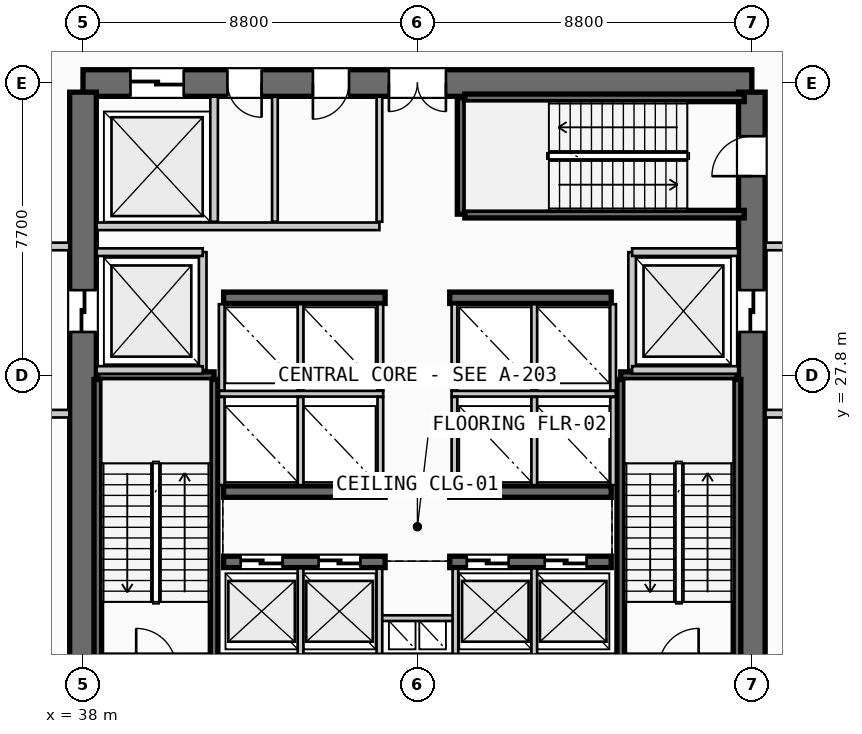
"""IFC4 building model, lengths in metres.
Left out: names, types, materials, properties, quantities, classifications, styles, units other than length and angle.
Written with IfcOpenShell. Run it as: python <this file> out.ifc"""

import sys

from ifc_helpers import new_model, si_unit, direction, frame, frame_2d, origin, place, context, subcontext, project, spatial, rectangle, extrude, source, transform, mapped, element, fill, save


model = new_model("IFC4")
c1 = context("Model", 3, precision=1e-05, world=origin(), true_north=direction((0.0, 1.0)))
c2 = subcontext(c1, "Body", "Model", "MODEL_VIEW")
j1 = project(units=[si_unit("LENGTHUNIT", "METRE"), si_unit("PLANEANGLEUNIT", "RADIAN")], contexts=[c1])
p1 = place(None, origin())
s1 = spatial("IfcSite", under=j1, at=p1, CompositionType="ELEMENT")
p2 = place(p1, origin())
s2 = spatial("IfcBuilding", under=s1, at=p2, CompositionType="ELEMENT")
p3 = place(p2, frame((0.0, 0.0, 14.8)))
s3 = spatial("IfcBuildingStorey", under=s2, at=p3, CompositionType="ELEMENT", Elevation=14.8)
p4 = place(p3, frame((38.0, 20.1, 0.0), z_axis=(0.0, 0.0, 1.0), x_axis=(1.0, 0.0, 0.0)))
e1 = element("IfcWall", 1, at=p4, inside=s3, PredefinedType="SHEAR", context=c2, shape_type="SweptSolid", body=[
    extrude(rectangle(XDim=17.6, YDim=0.7, at=frame_2d((8.8, 0.0))), origin(), (0.0, 0.0, 1.0), 4.53),
])
p5 = place(p4, frame((1.4, 0.0, 0.0)))
e2 = element("IfcOpeningElement", 2, at=p5, cuts=e1, PredefinedType="OPENING", context=c2, shape_type="SweptSolid", body=[
    extrude(rectangle(XDim=1.05, YDim=2.15, at=frame_2d((0.525, 1.075))), frame((0.0, 0.36, 0.0), z_axis=(0.0, -1.0, 0.0), x_axis=(1.0, 0.0, 0.0)), (0.0, 0.0, 1.0), 0.72),
])
p6 = place(p4, frame((15.15, 0.0, 0.0)))
e3 = element("IfcOpeningElement", 3, at=p6, cuts=e1, PredefinedType="OPENING", context=c2, shape_type="SweptSolid", body=[
    extrude(rectangle(XDim=1.05, YDim=2.15, at=frame_2d((0.525, 1.075))), frame((0.0, 0.36, 0.0), z_axis=(0.0, -1.0, 0.0), x_axis=(1.0, 0.0, 0.0)), (0.0, 0.0, 1.0), 0.72),
])
p7 = place(p3, frame((55.6, 35.5, 0.0), z_axis=(0.0, 0.0, 1.0), x_axis=(-1.0, 0.0, 0.0)))
e4 = element("IfcWall", 4, at=p7, inside=s3, PredefinedType="SHEAR", context=c2, shape_type="SweptSolid", body=[
    extrude(rectangle(XDim=17.6, YDim=0.7, at=frame_2d((8.8, 0.0))), origin(), (0.0, 0.0, 1.0), 4.53),
])
p8 = place(p7, frame((8.05, 0.0, 0.0)))
e5 = element("IfcOpeningElement", 5, at=p8, cuts=e4, PredefinedType="OPENING", context=c2, shape_type="SweptSolid", body=[
    extrude(rectangle(XDim=1.5, YDim=2.2, at=frame_2d((0.75, 1.1))), frame((0.0, 0.36, 0.0), z_axis=(0.0, -1.0, 0.0), x_axis=(1.0, 0.0, 0.0)), (0.0, 0.0, 1.0), 0.72),
])
p9 = place(p7, frame((14.95, 0.0, 0.0)))
e6 = element("IfcOpeningElement", 6, at=p9, cuts=e4, PredefinedType="OPENING", context=c2, shape_type="SweptSolid", body=[
    extrude(rectangle(XDim=1.4, YDim=2.3, at=frame_2d((0.7, 1.15))), frame((0.0, 0.36, 0.0), z_axis=(0.0, -1.0, 0.0), x_axis=(1.0, 0.0, 0.0)), (0.0, 0.0, 1.0), 0.72),
])
p10 = place(p7, frame((12.9, 0.0, 0.0)))
e7 = element("IfcOpeningElement", 7, at=p10, cuts=e4, PredefinedType="OPENING", context=c2, shape_type="SweptSolid", body=[
    extrude(rectangle(XDim=0.9, YDim=2.15, at=frame_2d((0.45, 1.075))), frame((0.0, 0.36, 0.0), z_axis=(0.0, -1.0, 0.0), x_axis=(1.0, 0.0, 0.0)), (0.0, 0.0, 1.0), 0.72),
])
p11 = place(p7, frame((10.6, 0.0, 0.0)))
e8 = element("IfcOpeningElement", 8, at=p11, cuts=e4, PredefinedType="OPENING", context=c2, shape_type="SweptSolid", body=[
    extrude(rectangle(XDim=0.95, YDim=2.15, at=frame_2d((0.475, 1.075))), frame((0.0, 0.36, 0.0), z_axis=(0.0, -1.0, 0.0), x_axis=(1.0, 0.0, 0.0)), (0.0, 0.0, 1.0), 0.72),
])
p12 = place(p3, frame((38.0, 35.26, 0.0), z_axis=(0.0, 0.0, 1.0), x_axis=(0.0, -1.0, 0.0)))
e9 = element("IfcWall", 9, at=p12, inside=s3, PredefinedType="SHEAR", context=c2, shape_type="SweptSolid", body=[
    extrude(rectangle(XDim=14.92, YDim=0.7, at=frame_2d((7.46, 0.0))), origin(), (0.0, 0.0, 1.0), 4.53),
])
p13 = place(p12, frame((5.21, 0.0, 0.0)))
e10 = element("IfcOpeningElement", 10, at=p13, cuts=e9, PredefinedType="OPENING", context=c2, shape_type="SweptSolid", body=[
    extrude(rectangle(XDim=1.1, YDim=2.2, at=frame_2d((0.55, 1.1))), frame((0.0, 0.36, 0.0), z_axis=(0.0, -1.0, 0.0), x_axis=(1.0, 0.0, 0.0)), (0.0, 0.0, 1.0), 0.72),
])
p14 = place(p3, frame((55.6, 20.34, 0.0), z_axis=(0.0, 0.0, 1.0), x_axis=(0.0, 1.0, 0.0)))
e11 = element("IfcWall", 11, at=p14, inside=s3, PredefinedType="SHEAR", context=c2, shape_type="SweptSolid", body=[
    extrude(rectangle(XDim=14.92, YDim=0.7, at=frame_2d((7.46, 0.0))), origin(), (0.0, 0.0, 1.0), 4.53),
])
p15 = place(p14, frame((12.71, 0.0, 0.0)))
e12 = element("IfcOpeningElement", 12, at=p15, cuts=e11, PredefinedType="OPENING", context=c2, shape_type="SweptSolid", body=[
    extrude(rectangle(XDim=1.05, YDim=2.15, at=frame_2d((0.525, 1.075))), frame((0.0, 0.36, 0.0), z_axis=(0.0, -1.0, 0.0), x_axis=(1.0, 0.0, 0.0)), (0.0, 0.0, 1.0), 0.72),
])
p16 = place(p14, frame((8.61, 0.0, 0.0)))
e13 = element("IfcOpeningElement", 13, at=p16, cuts=e11, PredefinedType="OPENING", context=c2, shape_type="SweptSolid", body=[
    extrude(rectangle(XDim=1.1, YDim=2.2, at=frame_2d((0.55, 1.1))), frame((0.0, 0.36, 0.0), z_axis=(0.0, -1.0, 0.0), x_axis=(1.0, 0.0, 0.0)), (0.0, 0.0, 1.0), 0.72),
])
p17 = place(p3, frame((41.7, 22.9, 0.0), z_axis=(0.0, 0.0, 1.0), x_axis=(1.0, 0.0, 0.0)))
e14 = element("IfcWall", 14, at=p17, inside=s3, PredefinedType="SHEAR", context=c2, shape_type="SweptSolid", body=[
    extrude(rectangle(XDim=4.25, YDim=0.3, at=frame_2d((2.125, 0.0))), origin(), (0.0, 0.0, 1.0), 4.53),
])
p18 = place(p17, frame((0.45, 0.0, 0.0)))
e15 = element("IfcOpeningElement", 15, at=p18, cuts=e14, PredefinedType="OPENING", context=c2, shape_type="SweptSolid", body=[
    extrude(rectangle(XDim=1.1, YDim=2.2, at=frame_2d((0.55, 1.1))), frame((0.0, 0.16, 0.0), z_axis=(0.0, -1.0, 0.0), x_axis=(1.0, 0.0, 0.0)), (0.0, 0.0, 1.0), 0.32),
])
p19 = place(p17, frame((2.5, 0.0, 0.0)))
e16 = element("IfcOpeningElement", 16, at=p19, cuts=e14, PredefinedType="OPENING", context=c2, shape_type="SweptSolid", body=[
    extrude(rectangle(XDim=1.1, YDim=2.2, at=frame_2d((0.55, 1.1))), frame((0.0, 0.16, 0.0), z_axis=(0.0, -1.0, 0.0), x_axis=(1.0, 0.0, 0.0)), (0.0, 0.0, 1.0), 0.32),
])
p20 = place(p3, frame((47.65, 22.9, 0.0), z_axis=(0.0, 0.0, 1.0), x_axis=(1.0, 0.0, 0.0)))
e17 = element("IfcWall", 17, at=p20, inside=s3, PredefinedType="SHEAR", context=c2, shape_type="SweptSolid", body=[
    extrude(rectangle(XDim=4.25, YDim=0.3, at=frame_2d((2.125, 0.0))), origin(), (0.0, 0.0, 1.0), 4.53),
])
p21 = place(p20, frame((0.45, 0.0, 0.0)))
e18 = element("IfcOpeningElement", 18, at=p21, cuts=e17, PredefinedType="OPENING", context=c2, shape_type="SweptSolid", body=[
    extrude(rectangle(XDim=1.1, YDim=2.2, at=frame_2d((0.55, 1.1))), frame((0.0, 0.16, 0.0), z_axis=(0.0, -1.0, 0.0), x_axis=(1.0, 0.0, 0.0)), (0.0, 0.0, 1.0), 0.32),
])
p22 = place(p20, frame((2.5, 0.0, 0.0)))
e19 = element("IfcOpeningElement", 19, at=p22, cuts=e17, PredefinedType="OPENING", context=c2, shape_type="SweptSolid", body=[
    extrude(rectangle(XDim=1.1, YDim=2.2, at=frame_2d((0.55, 1.1))), frame((0.0, 0.16, 0.0), z_axis=(0.0, -1.0, 0.0), x_axis=(1.0, 0.0, 0.0)), (0.0, 0.0, 1.0), 0.32),
])
for number, where, z_axis, x_axis in (
    (20, (41.7, 24.75, 0.0), (0.0, 0.0, 1.0), (1.0, 0.0, 0.0)),
    (21, (47.65, 24.75, 0.0), (0.0, 0.0, 1.0), (1.0, 0.0, 0.0)),
    (22, (41.7, 29.85, 0.0), (0.0, 0.0, 1.0), (1.0, 0.0, 0.0)),
    (23, (47.65, 29.85, 0.0), (0.0, 0.0, 1.0), (1.0, 0.0, 0.0)),
):
    element("IfcWall", number, at=place(p3, frame(where, z_axis=z_axis, x_axis=x_axis)), inside=s3, PredefinedType="SHEAR", context=c2, shape_type="SweptSolid", body=[
        extrude(rectangle(XDim=4.25, YDim=0.3, at=frame_2d((2.125, 0.0))), origin(), (0.0, 0.0, 1.0), 4.53),
    ])
p23 = place(p3, frame((38.39, 27.8, 0.0), z_axis=(0.0, 0.0, 1.0), x_axis=(1.0, 0.0, 0.0)))
e24 = element("IfcWall", 24, at=p23, inside=s3, PredefinedType="SHEAR", context=c2, shape_type="SweptSolid", body=[
    extrude(rectangle(XDim=3.06, YDim=0.2, at=frame_2d((1.53, 0.0))), origin(), (0.0, 0.0, 1.0), 4.53),
])
for number, where, z_axis, x_axis in (
    (25, (41.45, 27.7, 0.0), (0.0, 0.0, 1.0), (0.0, -1.0, 0.0)),
    (26, (38.39, 20.35, 0.0), (0.0, 0.0, 1.0), (0.0, 1.0, 0.0)),
):
    element("IfcWall", number, at=place(p3, frame(where, z_axis=z_axis, x_axis=x_axis)), inside=s3, PredefinedType="SHEAR", context=c2, shape_type="SweptSolid", body=[
        extrude(rectangle(XDim=7.35, YDim=0.2, at=frame_2d((3.675, 0.0))), origin(), (0.0, 0.0, 1.0), 4.53),
    ])
p24 = place(p3, frame((52.15, 27.8, 0.0), z_axis=(0.0, 0.0, 1.0), x_axis=(1.0, 0.0, 0.0)))
e27 = element("IfcWall", 27, at=p24, inside=s3, PredefinedType="SHEAR", context=c2, shape_type="SweptSolid", body=[
    extrude(rectangle(XDim=3.06, YDim=0.2, at=frame_2d((1.53, 0.0))), origin(), (0.0, 0.0, 1.0), 4.53),
])
for number, where, z_axis, x_axis in (
    (28, (55.21, 27.7, 0.0), (0.0, 0.0, 1.0), (0.0, -1.0, 0.0)),
    (29, (52.15, 20.35, 0.0), (0.0, 0.0, 1.0), (0.0, 1.0, 0.0)),
):
    element("IfcWall", number, at=place(p3, frame(where, z_axis=z_axis, x_axis=x_axis)), inside=s3, PredefinedType="SHEAR", context=c2, shape_type="SweptSolid", body=[
        extrude(rectangle(XDim=7.35, YDim=0.2, at=frame_2d((3.675, 0.0))), origin(), (0.0, 0.0, 1.0), 4.53),
    ])
p25 = place(p3, frame((47.95, 32.05, 0.0), z_axis=(0.0, 0.0, 1.0), x_axis=(0.0, 1.0, 0.0)))
e30 = element("IfcWall", 30, at=p25, inside=s3, PredefinedType="SHEAR", context=c2, shape_type="SweptSolid", body=[
    extrude(rectangle(XDim=3.06, YDim=0.2, at=frame_2d((1.53, 0.0))), origin(), (0.0, 0.0, 1.0), 4.53),
])
for number, where, z_axis, x_axis in (
    (31, (48.05, 35.11, 0.0), (0.0, 0.0, 1.0), (1.0, 0.0, 0.0)),
    (32, (55.4, 32.05, 0.0), (0.0, 0.0, 1.0), (-1.0, 0.0, 0.0)),
):
    element("IfcWall", number, at=place(p3, frame(where, z_axis=z_axis, x_axis=x_axis)), inside=s3, PredefinedType="SHEAR", context=c2, shape_type="SweptSolid", body=[
        extrude(rectangle(XDim=7.35, YDim=0.2, at=frame_2d((3.675, 0.0))), origin(), (0.0, 0.0, 1.0), 4.53),
    ])
p26 = place(p3, frame((45.8, 21.42, 0.0), z_axis=(0.0, 0.0, 1.0), x_axis=(1.0, 0.0, 0.0)))
e33 = element("IfcWall", 33, at=p26, inside=s3, PredefinedType="PARTITIONING", context=c2, shape_type="SweptSolid", body=[
    extrude(rectangle(XDim=2.0, YDim=0.15, at=frame_2d((1.0, 0.0))), origin(), (0.0, 0.0, 1.0), 3.743),
])
for number, where, z_axis, x_axis in (
    (34, (45.8, 20.48, 0.0), (0.0, 0.0, 1.0), (0.0, 1.0, 0.0)),
    (35, (47.8, 20.48, 0.0), (0.0, 0.0, 1.0), (0.0, 1.0, 0.0)),
):
    element("IfcWall", number, at=place(p3, frame(where, z_axis=z_axis, x_axis=x_axis)), inside=s3, PredefinedType="PARTITIONING", context=c2, shape_type="SweptSolid", body=[
        extrude(rectangle(XDim=2.24, YDim=0.15, at=frame_2d((1.12, 0.0))), origin(), (0.0, 0.0, 1.0), 3.743),
    ])
p27 = place(p3, frame((41.15, 27.95, 0.0), z_axis=(0.0, 0.0, 1.0), x_axis=(0.0, 1.0, 0.0)))
e36 = element("IfcWall", 36, at=p27, inside=s3, PredefinedType="PARTITIONING", context=c2, shape_type="SweptSolid", body=[
    extrude(rectangle(XDim=3.1, YDim=0.2, at=frame_2d((1.55, 0.0))), origin(), (0.0, 0.0, 1.0), 3.743),
])
for number, where, z_axis, x_axis in (
    (37, (38.36, 27.95, 0.0), (0.0, 0.0, 1.0), (1.0, 0.0, 0.0)),
    (38, (38.36, 31.05, 0.0), (0.0, 0.0, 1.0), (1.0, 0.0, 0.0)),
):
    element("IfcWall", number, at=place(p3, frame(where, z_axis=z_axis, x_axis=x_axis)), inside=s3, PredefinedType="PARTITIONING", context=c2, shape_type="SweptSolid", body=[
        extrude(rectangle(XDim=2.79, YDim=0.2, at=frame_2d((1.395, 0.0))), origin(), (0.0, 0.0, 1.0), 3.743),
    ])
for number, where, z_axis, x_axis in (
    (39, (34.5, 26.8, 0.0), (0.0, 0.0, 1.0), (1.0, 0.0, 0.0)),
    (40, (34.5, 31.2, 0.0), (0.0, 0.0, 1.0), (1.0, 0.0, 0.0)),
):
    element("IfcWall", number, at=place(p3, frame(where, z_axis=z_axis, x_axis=x_axis)), inside=s3, PredefinedType="PARTITIONING", context=c2, shape_type="SweptSolid", body=[
        extrude(rectangle(XDim=3.14, YDim=0.2, at=frame_2d((1.57, 0.0))), origin(), (0.0, 0.0, 1.0), 3.743),
    ])
p28 = place(p3, frame((52.45, 27.95, 0.0), z_axis=(0.0, 0.0, 1.0), x_axis=(0.0, 1.0, 0.0)))
e41 = element("IfcWall", 41, at=p28, inside=s3, PredefinedType="PARTITIONING", context=c2, shape_type="SweptSolid", body=[
    extrude(rectangle(XDim=3.1, YDim=0.2, at=frame_2d((1.55, 0.0))), origin(), (0.0, 0.0, 1.0), 3.743),
])
for number, where, z_axis, x_axis in (
    (42, (52.45, 27.95, 0.0), (0.0, 0.0, 1.0), (1.0, 0.0, 0.0)),
    (43, (52.45, 31.05, 0.0), (0.0, 0.0, 1.0), (1.0, 0.0, 0.0)),
):
    element("IfcWall", number, at=place(p3, frame(where, z_axis=z_axis, x_axis=x_axis)), inside=s3, PredefinedType="PARTITIONING", context=c2, shape_type="SweptSolid", body=[
        extrude(rectangle(XDim=2.79, YDim=0.2, at=frame_2d((1.395, 0.0))), origin(), (0.0, 0.0, 1.0), 3.743),
    ])
for number, where, z_axis, x_axis in (
    (44, (55.96, 26.8, 0.0), (0.0, 0.0, 1.0), (1.0, 0.0, 0.0)),
    (45, (55.96, 31.2, 0.0), (0.0, 0.0, 1.0), (1.0, 0.0, 0.0)),
):
    element("IfcWall", number, at=place(p3, frame(where, z_axis=z_axis, x_axis=x_axis)), inside=s3, PredefinedType="PARTITIONING", context=c2, shape_type="SweptSolid", body=[
        extrude(rectangle(XDim=3.14, YDim=0.2, at=frame_2d((1.57, 0.0))), origin(), (0.0, 0.0, 1.0), 3.743),
    ])
for number, where, z_axis, x_axis in (
    (46, (43.725, 20.46, 0.0), (0.0, 0.0, 1.0), (0.0, 1.0, 0.0)),
    (47, (49.875, 20.46, 0.0), (0.0, 0.0, 1.0), (0.0, 1.0, 0.0)),
):
    element("IfcWall", number, at=place(p3, frame(where, z_axis=z_axis, x_axis=x_axis)), inside=s3, PredefinedType="PARTITIONING", context=c2, shape_type="SweptSolid", body=[
        extrude(rectangle(XDim=2.27, YDim=0.15, at=frame_2d((1.135, 0.0))), origin(), (0.0, 0.0, 1.0), 3.743),
    ])
p29 = place(p3, frame((41.58, 27.325, 0.0), z_axis=(0.0, 0.0, 1.0), x_axis=(1.0, 0.0, 0.0)))
e48 = element("IfcWall", 48, at=p29, inside=s3, PredefinedType="PARTITIONING", context=c2, shape_type="SweptSolid", body=[
    extrude(rectangle(XDim=4.32, YDim=0.15, at=frame_2d((2.16, 0.0))), origin(), (0.0, 0.0, 1.0), 3.743),
])
p30 = place(p3, frame((47.7, 27.325, 0.0), z_axis=(0.0, 0.0, 1.0), x_axis=(1.0, 0.0, 0.0)))
e49 = element("IfcWall", 49, at=p30, inside=s3, PredefinedType="PARTITIONING", context=c2, shape_type="SweptSolid", body=[
    extrude(rectangle(XDim=4.32, YDim=0.15, at=frame_2d((2.16, 0.0))), origin(), (0.0, 0.0, 1.0), 3.743),
])
for number, where, z_axis, x_axis in (
    (50, (41.65, 24.92, 0.0), (0.0, 0.0, 1.0), (0.0, 1.0, 0.0)),
    (51, (43.725, 24.92, 0.0), (0.0, 0.0, 1.0), (0.0, 1.0, 0.0)),
    (52, (45.825, 24.92, 0.0), (0.0, 0.0, 1.0), (0.0, 1.0, 0.0)),
    (53, (47.775, 24.92, 0.0), (0.0, 0.0, 1.0), (0.0, 1.0, 0.0)),
    (54, (49.875, 24.92, 0.0), (0.0, 0.0, 1.0), (0.0, 1.0, 0.0)),
    (55, (51.95, 24.92, 0.0), (0.0, 0.0, 1.0), (0.0, 1.0, 0.0)),
):
    element("IfcWall", number, at=place(p3, frame(where, z_axis=z_axis, x_axis=x_axis)), inside=s3, PredefinedType="PARTITIONING", context=c2, shape_type="SweptSolid", body=[
        extrude(rectangle(XDim=2.32, YDim=0.15, at=frame_2d((1.16, 0.0))), origin(), (0.0, 0.0, 1.0), 3.743),
    ])
for number, where, z_axis, x_axis in (
    (56, (41.65, 27.41, 0.0), (0.0, 0.0, 1.0), (0.0, 1.0, 0.0)),
    (57, (43.725, 27.41, 0.0), (0.0, 0.0, 1.0), (0.0, 1.0, 0.0)),
    (58, (45.825, 27.41, 0.0), (0.0, 0.0, 1.0), (0.0, 1.0, 0.0)),
    (59, (47.775, 27.41, 0.0), (0.0, 0.0, 1.0), (0.0, 1.0, 0.0)),
    (60, (49.875, 27.41, 0.0), (0.0, 0.0, 1.0), (0.0, 1.0, 0.0)),
    (61, (51.95, 27.41, 0.0), (0.0, 0.0, 1.0), (0.0, 1.0, 0.0)),
):
    element("IfcWall", number, at=place(p3, frame(where, z_axis=z_axis, x_axis=x_axis)), inside=s3, PredefinedType="PARTITIONING", context=c2, shape_type="SweptSolid", body=[
        extrude(rectangle(XDim=2.27, YDim=0.15, at=frame_2d((1.135, 0.0))), origin(), (0.0, 0.0, 1.0), 3.743),
    ])
p31 = place(p3, frame((41.45, 31.85, 0.0), z_axis=(0.0, 0.0, 1.0), x_axis=(0.0, 1.0, 0.0)))
e62 = element("IfcWall", 62, at=p31, inside=s3, PredefinedType="PARTITIONING", context=c2, shape_type="SweptSolid", body=[
    extrude(rectangle(XDim=3.29, YDim=0.2, at=frame_2d((1.645, 0.0))), origin(), (0.0, 0.0, 1.0), 3.743),
])
p32 = place(p3, frame((38.36, 31.73, 0.0), z_axis=(0.0, 0.0, 1.0), x_axis=(1.0, 0.0, 0.0)))
e63 = element("IfcWall", 63, at=p32, inside=s3, PredefinedType="PARTITIONING", context=c2, shape_type="SweptSolid", body=[
    extrude(rectangle(XDim=7.44, YDim=0.2, at=frame_2d((3.72, 0.0))), origin(), (0.0, 0.0, 1.0), 3.743),
])
p33 = place(p3, frame((45.8, 31.85, 0.0), z_axis=(0.0, 0.0, 1.0), x_axis=(0.0, 1.0, 0.0)))
e64 = element("IfcWall", 64, at=p33, inside=s3, PredefinedType="PARTITIONING", context=c2, shape_type="SweptSolid", body=[
    extrude(rectangle(XDim=3.29, YDim=0.15, at=frame_2d((1.645, 0.0))), origin(), (0.0, 0.0, 1.0), 3.743),
])
p34 = place(p3, frame((43.05, 31.85, 0.0), z_axis=(0.0, 0.0, 1.0), x_axis=(0.0, 1.0, 0.0)))
e65 = element("IfcWall", 65, at=p34, inside=s3, PredefinedType="PLUMBINGWALL", context=c2, shape_type="SweptSolid", body=[
    extrude(rectangle(XDim=3.29, YDim=0.15, at=frame_2d((1.645, 0.0))), origin(), (0.0, 0.0, 1.0), 3.743),
])
m1 = source(origin(), c2, "Body", "SweptSolid", [
    extrude(rectangle(XDim=1.05, YDim=2.15, at=frame_2d((0.525, 1.075))), frame((0.0, 0.025, 0.0), z_axis=(0.0, -1.0, 0.0), x_axis=(1.0, 0.0, 0.0)), (0.0, 0.0, 1.0), 0.05),
])
p35 = place(p15, origin())
e66 = element("IfcDoor", 66, at=p35, inside=s3, OperationType="SINGLE_SWING_LEFT", PredefinedType="DOOR", context=c2, shape_type="MappedRepresentation", body=[
    mapped(m1, transform((0.0, 0.0, 0.0), scale=1.0)),
])
fill(e12, e66)
m2 = source(origin(), c2, "Body", "SweptSolid", [
    extrude(rectangle(XDim=1.5, YDim=2.2, at=frame_2d((0.75, 1.1))), frame((0.0, 0.025, 0.0), z_axis=(0.0, -1.0, 0.0), x_axis=(1.0, 0.0, 0.0)), (0.0, 0.0, 1.0), 0.05),
])
p36 = place(p8, origin())
e67 = element("IfcDoor", 67, at=p36, inside=s3, OperationType="DOUBLE_DOOR_SINGLE_SWING", PredefinedType="DOOR", context=c2, shape_type="MappedRepresentation", body=[
    mapped(m2, transform((0.0, 0.0, 0.0), scale=1.0)),
])
fill(e5, e67)
m3 = source(origin(), c2, "Body", "SweptSolid", [
    extrude(rectangle(XDim=1.1, YDim=2.2, at=frame_2d((0.55, 1.1))), frame((0.0, 0.025, 0.0), z_axis=(0.0, -1.0, 0.0), x_axis=(1.0, 0.0, 0.0)), (0.0, 0.0, 1.0), 0.05),
])
p37 = place(p13, origin())
e68 = element("IfcDoor", 68, at=p37, inside=s3, OperationType="SLIDING_TO_LEFT", PredefinedType="DOOR", context=c2, shape_type="MappedRepresentation", body=[
    mapped(m3, transform((0.0, 0.0, 0.0), scale=1.0)),
])
fill(e10, e68)
p38 = place(p16, origin())
e69 = element("IfcDoor", 69, at=p38, inside=s3, OperationType="SLIDING_TO_RIGHT", PredefinedType="DOOR", context=c2, shape_type="MappedRepresentation", body=[
    mapped(m3, transform((0.0, 0.0, 0.0), scale=1.0)),
])
fill(e13, e69)
p39 = place(p18, origin())
e70 = element("IfcDoor", 70, at=p39, inside=s3, OperationType="SLIDING_TO_LEFT", PredefinedType="DOOR", context=c2, shape_type="MappedRepresentation", body=[
    mapped(m3, transform((0.0, 0.0, 0.0), scale=1.0)),
])
fill(e15, e70)
p40 = place(p19, origin())
e71 = element("IfcDoor", 71, at=p40, inside=s3, OperationType="SLIDING_TO_LEFT", PredefinedType="DOOR", context=c2, shape_type="MappedRepresentation", body=[
    mapped(m3, transform((0.0, 0.0, 0.0), scale=1.0)),
])
fill(e16, e71)
p41 = place(p21, origin())
e72 = element("IfcDoor", 72, at=p41, inside=s3, OperationType="SLIDING_TO_LEFT", PredefinedType="DOOR", context=c2, shape_type="MappedRepresentation", body=[
    mapped(m3, transform((0.0, 0.0, 0.0), scale=1.0)),
])
fill(e18, e72)
p42 = place(p22, origin())
e73 = element("IfcDoor", 73, at=p42, inside=s3, OperationType="SLIDING_TO_LEFT", PredefinedType="DOOR", context=c2, shape_type="MappedRepresentation", body=[
    mapped(m3, transform((0.0, 0.0, 0.0), scale=1.0)),
])
fill(e19, e73)
m4 = source(origin(), c2, "Body", "SweptSolid", [
    extrude(rectangle(XDim=1.4, YDim=2.3, at=frame_2d((0.7, 1.15))), frame((0.0, 0.025, 0.0), z_axis=(0.0, -1.0, 0.0), x_axis=(1.0, 0.0, 0.0)), (0.0, 0.0, 1.0), 0.05),
])
p43 = place(p9, origin())
e74 = element("IfcDoor", 74, at=p43, inside=s3, OperationType="SLIDING_TO_RIGHT", PredefinedType="DOOR", context=c2, shape_type="MappedRepresentation", body=[
    mapped(m4, transform((0.0, 0.0, 0.0), scale=1.0)),
])
fill(e6, e74)
m5 = source(origin(), c2, "Body", "SweptSolid", [
    extrude(rectangle(XDim=0.9, YDim=2.15, at=frame_2d((0.45, 1.075))), frame((0.0, 0.025, 0.0), z_axis=(0.0, -1.0, 0.0), x_axis=(1.0, 0.0, 0.0)), (0.0, 0.0, 1.0), 0.05),
])
p44 = place(p10, origin())
e75 = element("IfcDoor", 75, at=p44, inside=s3, OperationType="SINGLE_SWING_LEFT", PredefinedType="DOOR", context=c2, shape_type="MappedRepresentation", body=[
    mapped(m5, transform((0.0, 0.0, 0.0), scale=1.0)),
])
fill(e7, e75)
m6 = source(origin(), c2, "Body", "SweptSolid", [
    extrude(rectangle(XDim=0.95, YDim=2.15, at=frame_2d((0.475, 1.075))), frame((0.0, 0.025, 0.0), z_axis=(0.0, -1.0, 0.0), x_axis=(1.0, 0.0, 0.0)), (0.0, 0.0, 1.0), 0.05),
])
p45 = place(p11, origin())
e76 = element("IfcDoor", 76, at=p45, inside=s3, OperationType="SINGLE_SWING_RIGHT", PredefinedType="DOOR", context=c2, shape_type="MappedRepresentation", body=[
    mapped(m6, transform((0.0, 0.0, 0.0), scale=1.0)),
])
fill(e8, e76)
save(model, sys.argv[1])
